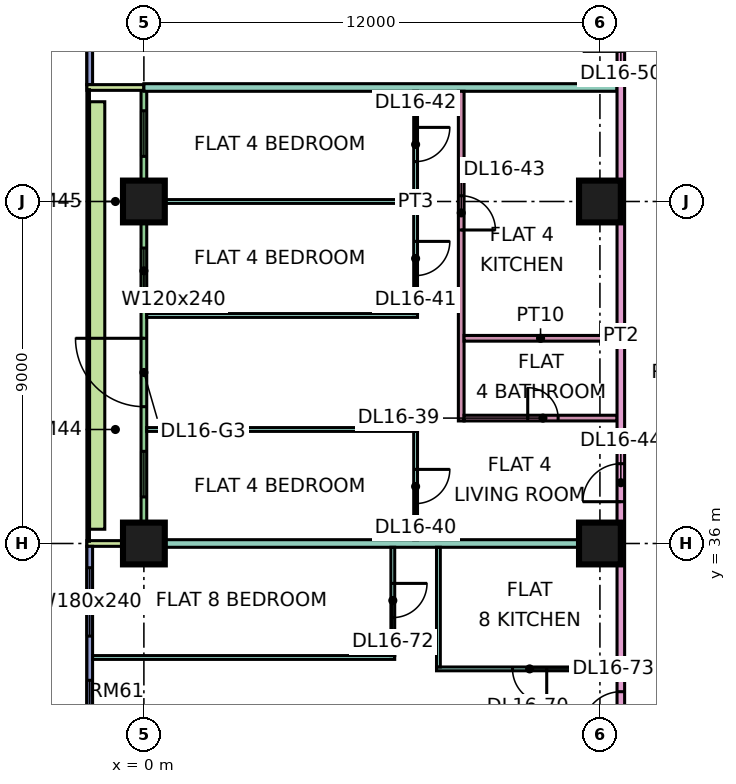
"""IFC4 building model, lengths in metres.
Left out: names, types, materials, properties, quantities, classifications, styles, units other than length and angle.
Written with IfcOpenShell. Run it as: python <this file> out.ifc"""

import sys

from ifc_helpers import new_model, si_unit, direction, frame, frame_2d, origin, origin_2d, place, context, subcontext, project, spatial, rectangle, extrude, element, fill, save


model = new_model("IFC4")
c1 = context("Model", 3, precision=1e-05, world=origin(), true_north=direction((0.0, 1.0)))
c2 = subcontext(c1, "Body", "Model", "MODEL_VIEW")
j1 = project(units=[si_unit("LENGTHUNIT", "METRE"), si_unit("PLANEANGLEUNIT", "RADIAN")], contexts=[c1])
p1 = place(None, origin())
s1 = spatial("IfcSite", under=j1, at=p1, CompositionType="ELEMENT")
p2 = place(p1, origin())
s2 = spatial("IfcBuilding", under=s1, at=p2, CompositionType="ELEMENT")
p3 = place(p2, frame((0.0, 0.0, 75.15)))
s3 = spatial("IfcBuildingStorey", under=s2, at=p3, CompositionType="ELEMENT", Elevation=75.15)
p4 = place(p3, frame((0.0, 36.0, 0.0), z_axis=(0.0, 0.0, 1.0), x_axis=(1.0, 0.0, 0.0)))
e1 = element("IfcColumn", 1, at=p4, inside=s3, PredefinedType="COLUMN", context=c2, shape_type="SweptSolid", body=[
    extrude(rectangle(XDim=1.1, YDim=1.1, at=origin_2d()), origin(), (0.0, 0.0, 1.0), 3.75),
])
for number, where, z_axis, x_axis in (
    (2, (0.0, 45.0, 0.0), (0.0, 0.0, 1.0), (1.0, 0.0, 0.0)),
    (3, (12.0, 36.0, 0.0), (0.0, 0.0, 1.0), (1.0, 0.0, 0.0)),
    (4, (12.0, 45.0, 0.0), (0.0, 0.0, 1.0), (1.0, 0.0, 0.0)),
):
    element("IfcColumn", number, at=place(p3, frame(where, z_axis=z_axis, x_axis=x_axis)), inside=s3, PredefinedType="COLUMN", context=c2, shape_type="SweptSolid", body=[
        extrude(rectangle(XDim=1.1, YDim=1.1, at=origin_2d()), origin(), (0.0, 0.0, 1.0), 3.75),
    ])
p5 = place(p3, frame((-1.425, 61.5, 0.0), z_axis=(0.0, 0.0, 1.0), x_axis=(0.0, -1.0, 0.0)))
e5 = element("IfcWall", 5, at=p5, inside=s3, PredefinedType="SOLIDWALL", context=c2, shape_type="SweptSolid", body=[
    extrude(rectangle(XDim=13.425, YDim=0.15, at=frame_2d((6.712, 0.0))), origin(), (0.0, 0.0, 1.0), 3.35),
])
p6 = place(p5, frame((0.3, 0.0, 0.45)))
e6 = element("IfcOpeningElement", 6, at=p6, cuts=e5, PredefinedType="OPENING", context=c2, shape_type="SweptSolid", body=[
    extrude(rectangle(XDim=0.9, YDim=2.4, at=frame_2d((0.45, 1.2))), frame((0.0, 0.085, 0.0), z_axis=(0.0, -1.0, 0.0), x_axis=(1.0, 0.0, 0.0)), (0.0, 0.0, 1.0), 0.17),
])
p7 = place(p5, frame((2.1, 0.0, 0.45)))
e7 = element("IfcOpeningElement", 7, at=p7, cuts=e5, PredefinedType="OPENING", context=c2, shape_type="SweptSolid", body=[
    extrude(rectangle(XDim=1.8, YDim=2.4, at=frame_2d((0.9, 1.2))), frame((0.0, 0.085, 0.0), z_axis=(0.0, -1.0, 0.0), x_axis=(1.0, 0.0, 0.0)), (0.0, 0.0, 1.0), 0.17),
])
p8 = place(p5, frame((5.1, 0.0, 0.45)))
e8 = element("IfcOpeningElement", 8, at=p8, cuts=e5, PredefinedType="OPENING", context=c2, shape_type="SweptSolid", body=[
    extrude(rectangle(XDim=1.8, YDim=2.4, at=frame_2d((0.9, 1.2))), frame((0.0, 0.085, 0.0), z_axis=(0.0, -1.0, 0.0), x_axis=(1.0, 0.0, 0.0)), (0.0, 0.0, 1.0), 0.17),
])
p9 = place(p5, frame((8.962, 0.0, 0.45)))
e9 = element("IfcOpeningElement", 9, at=p9, cuts=e5, PredefinedType="OPENING", context=c2, shape_type="SweptSolid", body=[
    extrude(rectangle(XDim=3.0, YDim=2.4, at=frame_2d((1.5, 1.2))), frame((0.0, 0.085, 0.0), z_axis=(0.0, -1.0, 0.0), x_axis=(1.0, 0.0, 0.0)), (0.0, 0.0, 1.0), 0.17),
])
p10 = place(p3, frame((0.0, 47.925, 0.0), z_axis=(0.0, 0.0, 1.0), x_axis=(0.0, -1.0, 0.0)))
e10 = element("IfcWall", 10, at=p10, inside=s3, PredefinedType="SOLIDWALL", context=c2, shape_type="SweptSolid", body=[
    extrude(rectangle(XDim=11.85, YDim=0.15, at=frame_2d((5.925, 0.0))), origin(), (0.0, 0.0, 1.0), 3.35),
])
p11 = place(p10, frame((0.538, 0.0, 0.45)))
e11 = element("IfcOpeningElement", 11, at=p11, cuts=e10, PredefinedType="OPENING", context=c2, shape_type="SweptSolid", body=[
    extrude(rectangle(XDim=1.2, YDim=2.4, at=frame_2d((0.6, 1.2))), frame((0.0, 0.085, 0.0), z_axis=(0.0, -1.0, 0.0), x_axis=(1.0, 0.0, 0.0)), (0.0, 0.0, 1.0), 0.17),
])
p12 = place(p10, frame((4.15, 0.0, 0.45)))
e12 = element("IfcOpeningElement", 12, at=p12, cuts=e10, PredefinedType="OPENING", context=c2, shape_type="SweptSolid", body=[
    extrude(rectangle(XDim=1.2, YDim=2.4, at=frame_2d((0.6, 1.2))), frame((0.0, 0.085, 0.0), z_axis=(0.0, -1.0, 0.0), x_axis=(1.0, 0.0, 0.0)), (0.0, 0.0, 1.0), 0.17),
])
p13 = place(p10, frame((6.525, 0.0, 0.0)))
e13 = element("IfcOpeningElement", 13, at=p13, cuts=e10, PredefinedType="OPENING", context=c2, shape_type="SweptSolid", body=[
    extrude(rectangle(XDim=1.8, YDim=2.4, at=frame_2d((0.9, 1.2))), frame((0.0, 0.085, 0.0), z_axis=(0.0, -1.0, 0.0), x_axis=(1.0, 0.0, 0.0)), (0.0, 0.0, 1.0), 0.17),
])
p14 = place(p10, frame((9.5, 0.0, 0.45)))
e14 = element("IfcOpeningElement", 14, at=p14, cuts=e10, PredefinedType="OPENING", context=c2, shape_type="SweptSolid", body=[
    extrude(rectangle(XDim=1.2, YDim=2.4, at=frame_2d((0.6, 1.2))), frame((0.0, 0.085, 0.0), z_axis=(0.0, -1.0, 0.0), x_axis=(1.0, 0.0, 0.0)), (0.0, 0.0, 1.0), 0.17),
])
for number, where, z_axis, x_axis in (
    (15, (-1.5, 48.0, 0.0), (0.0, 0.0, 1.0), (1.0, 0.0, 0.0)),
    (16, (-1.5, 36.0, 0.0), (0.0, 0.0, 1.0), (1.0, 0.0, 0.0)),
):
    element("IfcWall", number, at=place(p3, frame(where, z_axis=z_axis, x_axis=x_axis)), inside=s3, PredefinedType="SOLIDWALL", context=c2, shape_type="SweptSolid", body=[
        extrude(rectangle(XDim=1.5, YDim=0.15, at=frame_2d((0.75, 0.0))), origin(), (0.0, 0.0, 1.0), 3.35),
    ])
p15 = place(p3, frame((-1.425, 35.925, 0.0), z_axis=(0.0, 0.0, 1.0), x_axis=(0.0, -1.0, 0.0)))
e17 = element("IfcWall", 17, at=p15, inside=s3, PredefinedType="SOLIDWALL", context=c2, shape_type="SweptSolid", body=[
    extrude(rectangle(XDim=11.85, YDim=0.15, at=frame_2d((5.925, 0.0))), origin(), (0.0, 0.0, 1.0), 3.35),
])
p16 = place(p15, frame((0.562, 0.0, 0.45)))
e18 = element("IfcOpeningElement", 18, at=p16, cuts=e17, PredefinedType="OPENING", context=c2, shape_type="SweptSolid", body=[
    extrude(rectangle(XDim=1.8, YDim=2.4, at=frame_2d((0.9, 1.2))), frame((0.0, 0.085, 0.0), z_axis=(0.0, -1.0, 0.0), x_axis=(1.0, 0.0, 0.0)), (0.0, 0.0, 1.0), 0.17),
])
p17 = place(p15, frame((3.525, 0.0, 0.45)))
e19 = element("IfcOpeningElement", 19, at=p17, cuts=e17, PredefinedType="OPENING", context=c2, shape_type="SweptSolid", body=[
    extrude(rectangle(XDim=4.8, YDim=2.4, at=frame_2d((2.4, 1.2))), frame((0.0, 0.085, 0.0), z_axis=(0.0, -1.0, 0.0), x_axis=(1.0, 0.0, 0.0)), (0.0, 0.0, 1.0), 0.17),
])
p18 = place(p15, frame((9.488, 0.0, 0.45)))
e20 = element("IfcOpeningElement", 20, at=p18, cuts=e17, PredefinedType="OPENING", context=c2, shape_type="SweptSolid", body=[
    extrude(rectangle(XDim=1.8, YDim=2.4, at=frame_2d((0.9, 1.2))), frame((0.0, 0.085, 0.0), z_axis=(0.0, -1.0, 0.0), x_axis=(1.0, 0.0, 0.0)), (0.0, 0.0, 1.0), 0.17),
])
p19 = place(p3, frame((-1.229, 47.625, 0.0), z_axis=(0.0, 0.0, 1.0), x_axis=(0.0, -1.0, 0.0)))
e21 = element("IfcWall", 21, at=p19, inside=s3, PredefinedType="SOLIDWALL", context=c2, shape_type="SweptSolid", body=[
    extrude(rectangle(XDim=11.25, YDim=0.4, at=frame_2d((5.625, 0.0))), origin(), (0.0, 0.0, 1.0), 0.7),
])
p20 = place(p3, frame((-1.35, 33.0, 0.0), z_axis=(0.0, 0.0, 1.0), x_axis=(1.0, 0.0, 0.0)))
e22 = element("IfcWall", 22, at=p20, inside=s3, PredefinedType="PARTITIONING", context=c2, shape_type="SweptSolid", body=[
    extrude(rectangle(XDim=7.95, YDim=0.1, at=frame_2d((3.975, 0.0))), origin(), (0.0, 0.0, 1.0), 3.35),
])
e23 = element("IfcWall", 23, at=p4, inside=s3, PredefinedType="PARTITIONING", context=c2, shape_type="SweptSolid", body=[
    extrude(rectangle(XDim=12.45, YDim=0.2, at=frame_2d((6.225, 0.0))), origin(), (0.0, 0.0, 1.0), 3.35),
])
p21 = place(p3, frame((0.0, 48.0, 0.0), z_axis=(0.0, 0.0, 1.0), x_axis=(1.0, 0.0, 0.0)))
e24 = element("IfcWall", 24, at=p21, inside=s3, PredefinedType="PARTITIONING", context=c2, shape_type="SweptSolid", body=[
    extrude(rectangle(XDim=12.45, YDim=0.2, at=frame_2d((6.225, 0.0))), origin(), (0.0, 0.0, 1.0), 3.35),
])
for number, where, z_axis, x_axis in (
    (25, (0.074, 39.0, 0.0), (0.0, 0.0, 1.0), (1.0, 0.0, 0.0)),
    (26, (0.074, 42.0, 0.0), (0.0, 0.0, 1.0), (1.0, 0.0, 0.0)),
):
    element("IfcWall", number, at=place(p3, frame(where, z_axis=z_axis, x_axis=x_axis)), inside=s3, PredefinedType="PARTITIONING", context=c2, shape_type="SweptSolid", body=[
        extrude(rectangle(XDim=7.126, YDim=0.1, at=frame_2d((3.563, 0.0))), origin(), (0.0, 0.0, 1.0), 3.35),
    ])
p22 = place(p3, frame((0.074, 45.0, 0.0), z_axis=(0.0, 0.0, 1.0), x_axis=(1.0, 0.0, 0.0)))
e27 = element("IfcWall", 27, at=p22, inside=s3, PredefinedType="PARTITIONING", context=c2, shape_type="SweptSolid", body=[
    extrude(rectangle(XDim=7.026, YDim=0.1, at=frame_2d((3.513, 0.0))), origin(), (0.0, 0.0, 1.0), 3.35),
])
p23 = place(p3, frame((6.55, 33.05, 0.0), z_axis=(0.0, 0.0, 1.0), x_axis=(0.0, 1.0, 0.0)))
e28 = element("IfcWall", 28, at=p23, inside=s3, PredefinedType="PARTITIONING", context=c2, shape_type="SweptSolid", body=[
    extrude(rectangle(XDim=2.85, YDim=0.1, at=frame_2d((1.425, 0.0))), origin(), (0.0, 0.0, 1.0), 3.35),
])
p24 = place(p23, frame((1.0, 0.0, 0.0)))
e29 = element("IfcOpeningElement", 29, at=p24, cuts=e28, PredefinedType="OPENING", context=c2, shape_type="SweptSolid", body=[
    extrude(rectangle(XDim=0.9, YDim=2.1, at=frame_2d((0.45, 1.05))), frame((0.0, 0.06, 0.0), z_axis=(0.0, -1.0, 0.0), x_axis=(1.0, 0.0, 0.0)), (0.0, 0.0, 1.0), 0.12),
])
p25 = place(p3, frame((7.15, 36.1, 0.0), z_axis=(0.0, 0.0, 1.0), x_axis=(0.0, 1.0, 0.0)))
e30 = element("IfcWall", 30, at=p25, inside=s3, PredefinedType="PARTITIONING", context=c2, shape_type="SweptSolid", body=[
    extrude(rectangle(XDim=2.85, YDim=0.1, at=frame_2d((1.425, 0.0))), origin(), (0.0, 0.0, 1.0), 3.35),
])
p26 = place(p25, frame((0.95, 0.0, 0.0)))
e31 = element("IfcOpeningElement", 31, at=p26, cuts=e30, PredefinedType="OPENING", context=c2, shape_type="SweptSolid", body=[
    extrude(rectangle(XDim=0.9, YDim=2.1, at=frame_2d((0.45, 1.05))), frame((0.0, 0.06, 0.0), z_axis=(0.0, -1.0, 0.0), x_axis=(1.0, 0.0, 0.0)), (0.0, 0.0, 1.0), 0.12),
])
p27 = place(p3, frame((7.15, 42.05, 0.0), z_axis=(0.0, 0.0, 1.0), x_axis=(0.0, 1.0, 0.0)))
e32 = element("IfcWall", 32, at=p27, inside=s3, PredefinedType="PARTITIONING", context=c2, shape_type="SweptSolid", body=[
    extrude(rectangle(XDim=5.85, YDim=0.1, at=frame_2d((2.925, 0.0))), origin(), (0.0, 0.0, 1.0), 3.35),
])
p28 = place(p27, frame((1.0, 0.0, 0.0)))
e33 = element("IfcOpeningElement", 33, at=p28, cuts=e32, PredefinedType="OPENING", context=c2, shape_type="SweptSolid", body=[
    extrude(rectangle(XDim=0.9, YDim=2.1, at=frame_2d((0.45, 1.05))), frame((0.0, 0.06, 0.0), z_axis=(0.0, -1.0, 0.0), x_axis=(1.0, 0.0, 0.0)), (0.0, 0.0, 1.0), 0.12),
])
p29 = place(p27, frame((4.0, 0.0, 0.0)))
e34 = element("IfcOpeningElement", 34, at=p29, cuts=e32, PredefinedType="OPENING", context=c2, shape_type="SweptSolid", body=[
    extrude(rectangle(XDim=0.9, YDim=2.1, at=frame_2d((0.45, 1.05))), frame((0.0, 0.06, 0.0), z_axis=(0.0, -1.0, 0.0), x_axis=(1.0, 0.0, 0.0)), (0.0, 0.0, 1.0), 0.12),
])
p30 = place(p3, frame((7.7, 32.7, 0.0), z_axis=(0.0, 0.0, 1.0), x_axis=(1.0, 0.0, 0.0)))
e35 = element("IfcWall", 35, at=p30, inside=s3, PredefinedType="PARTITIONING", context=c2, shape_type="SweptSolid", body=[
    extrude(rectangle(XDim=4.75, YDim=0.1, at=frame_2d((2.375, 0.0))), origin(), (0.0, 0.0, 1.0), 3.35),
])
p31 = place(p30, frame((2.0, 0.0, 0.0)))
e36 = element("IfcOpeningElement", 36, at=p31, cuts=e35, PredefinedType="OPENING", context=c2, shape_type="SweptSolid", body=[
    extrude(rectangle(XDim=0.9, YDim=2.1, at=frame_2d((0.45, 1.05))), frame((0.0, 0.06, 0.0), z_axis=(0.0, -1.0, 0.0), x_axis=(1.0, 0.0, 0.0)), (0.0, 0.0, 1.0), 0.12),
])
p32 = place(p3, frame((7.75, 32.75, 0.0), z_axis=(0.0, 0.0, 1.0), x_axis=(0.0, 1.0, 0.0)))
e37 = element("IfcWall", 37, at=p32, inside=s3, PredefinedType="PARTITIONING", context=c2, shape_type="SweptSolid", body=[
    extrude(rectangle(XDim=3.15, YDim=0.1, at=frame_2d((1.575, 0.0))), origin(), (0.0, 0.0, 1.0), 3.35),
])
p33 = place(p3, frame((8.35, 39.225, 0.0), z_axis=(0.0, 0.0, 1.0), x_axis=(0.0, 1.0, 0.0)))
e38 = element("IfcWall", 38, at=p33, inside=s3, PredefinedType="PARTITIONING", context=c2, shape_type="SweptSolid", body=[
    extrude(rectangle(XDim=8.675, YDim=0.15, at=frame_2d((4.337, 0.0))), origin(), (0.0, 0.0, 1.0), 3.35),
])
p34 = place(p33, frame((5.025, 0.0, 0.0)))
e39 = element("IfcOpeningElement", 39, at=p34, cuts=e38, PredefinedType="OPENING", context=c2, shape_type="SweptSolid", body=[
    extrude(rectangle(XDim=0.9, YDim=2.1, at=frame_2d((0.45, 1.05))), frame((0.0, 0.085, 0.0), z_axis=(0.0, -1.0, 0.0), x_axis=(1.0, 0.0, 0.0)), (0.0, 0.0, 1.0), 0.17),
])
p35 = place(p3, frame((8.425, 39.3, 0.0), z_axis=(0.0, 0.0, 1.0), x_axis=(1.0, 0.0, 0.0)))
e40 = element("IfcWall", 40, at=p35, inside=s3, PredefinedType="PARTITIONING", context=c2, shape_type="SweptSolid", body=[
    extrude(rectangle(XDim=4.025, YDim=0.15, at=frame_2d((2.012, 0.0))), origin(), (0.0, 0.0, 1.0), 3.35),
])
p36 = place(p35, frame((1.675, 0.0, 0.0)))
e41 = element("IfcOpeningElement", 41, at=p36, cuts=e40, PredefinedType="OPENING", context=c2, shape_type="SweptSolid", body=[
    extrude(rectangle(XDim=0.8, YDim=2.1, at=frame_2d((0.4, 1.05))), frame((0.0, 0.085, 0.0), z_axis=(0.0, -1.0, 0.0), x_axis=(1.0, 0.0, 0.0)), (0.0, 0.0, 1.0), 0.17),
])
p37 = place(p3, frame((8.425, 41.4, 0.0), z_axis=(0.0, 0.0, 1.0), x_axis=(1.0, 0.0, 0.0)))
e42 = element("IfcWall", 42, at=p37, inside=s3, PredefinedType="PARTITIONING", context=c2, shape_type="SweptSolid", body=[
    extrude(rectangle(XDim=4.025, YDim=0.15, at=frame_2d((2.012, 0.0))), origin(), (0.0, 0.0, 1.0), 3.35),
])
p38 = place(p3, frame((12.55, 20.0, 0.0), z_axis=(0.0, 0.0, 1.0), x_axis=(0.0, 1.0, 0.0)))
e43 = element("IfcWall", 43, at=p38, inside=s3, PredefinedType="PARTITIONING", context=c2, shape_type="SweptSolid", body=[
    extrude(rectangle(XDim=42.926, YDim=0.2, at=frame_2d((21.463, 0.0))), origin(), (0.0, 0.0, 1.0), 3.35),
])
p39 = place(p38, frame((17.1, 0.0, 0.0)))
e44 = element("IfcOpeningElement", 44, at=p39, cuts=e43, PredefinedType="OPENING", context=c2, shape_type="SweptSolid", body=[
    extrude(rectangle(XDim=1.0, YDim=2.1, at=frame_2d((0.5, 1.05))), frame((0.0, 0.11, 0.0), z_axis=(0.0, -1.0, 0.0), x_axis=(1.0, 0.0, 0.0)), (0.0, 0.0, 1.0), 0.22),
])
p40 = place(p38, frame((28.95, 0.0, 0.0)))
e45 = element("IfcOpeningElement", 45, at=p40, cuts=e43, PredefinedType="OPENING", context=c2, shape_type="SweptSolid", body=[
    extrude(rectangle(XDim=1.0, YDim=2.1, at=frame_2d((0.5, 1.05))), frame((0.0, 0.11, 0.0), z_axis=(0.0, -1.0, 0.0), x_axis=(1.0, 0.0, 0.0)), (0.0, 0.0, 1.0), 0.22),
])
p41 = place(p38, frame((0.6, 0.0, 0.0)))
e46 = element("IfcOpeningElement", 46, at=p41, cuts=e43, PredefinedType="OPENING", context=c2, shape_type="SweptSolid", body=[
    extrude(rectangle(XDim=1.2, YDim=2.1, at=frame_2d((0.6, 1.05))), frame((0.0, 0.11, 0.0), z_axis=(0.0, -1.0, 0.0), x_axis=(1.0, 0.0, 0.0)), (0.0, 0.0, 1.0), 0.22),
])
p42 = place(p38, frame((11.1, 0.0, 0.0)))
e47 = element("IfcOpeningElement", 47, at=p42, cuts=e43, PredefinedType="OPENING", context=c2, shape_type="SweptSolid", body=[
    extrude(rectangle(XDim=1.0, YDim=2.1, at=frame_2d((0.5, 1.05))), frame((0.0, 0.11, 0.0), z_axis=(0.0, -1.0, 0.0), x_axis=(1.0, 0.0, 0.0)), (0.0, 0.0, 1.0), 0.22),
])
p43 = place(p11, origin())
e48 = element("IfcWindow", 48, at=p43, inside=s3, PartitioningType="SINGLE_PANEL", PredefinedType="WINDOW", context=c2, shape_type="SweptSolid", body=[
    extrude(rectangle(XDim=1.2, YDim=2.4, at=frame_2d((0.6, 1.2))), frame((0.0, 0.03, 0.0), z_axis=(0.0, -1.0, 0.0), x_axis=(1.0, 0.0, 0.0)), (0.0, 0.0, 1.0), 0.06),
])
fill(e11, e48)
p44 = place(p12, origin())
e49 = element("IfcWindow", 49, at=p44, inside=s3, PartitioningType="SINGLE_PANEL", PredefinedType="WINDOW", context=c2, shape_type="SweptSolid", body=[
    extrude(rectangle(XDim=1.2, YDim=2.4, at=frame_2d((0.6, 1.2))), frame((0.0, 0.03, 0.0), z_axis=(0.0, -1.0, 0.0), x_axis=(1.0, 0.0, 0.0)), (0.0, 0.0, 1.0), 0.06),
])
fill(e12, e49)
p45 = place(p13, frame((1.8, 0.0, 0.0), z_axis=(0.0, 0.0, 1.0), x_axis=(-1.0, 0.0, 0.0)))
e50 = element("IfcDoor", 50, at=p45, inside=s3, OperationType="DOUBLE_DOOR_SINGLE_SWING", PredefinedType="DOOR", context=c2, shape_type="SweptSolid", body=[
    extrude(rectangle(XDim=1.8, YDim=2.4, at=frame_2d((0.9, 1.2))), frame((0.0, 0.025, 0.0), z_axis=(0.0, -1.0, 0.0), x_axis=(1.0, 0.0, 0.0)), (0.0, 0.0, 1.0), 0.05),
])
fill(e13, e50)
p46 = place(p14, origin())
e51 = element("IfcWindow", 51, at=p46, inside=s3, PartitioningType="SINGLE_PANEL", PredefinedType="WINDOW", context=c2, shape_type="SweptSolid", body=[
    extrude(rectangle(XDim=1.2, YDim=2.4, at=frame_2d((0.6, 1.2))), frame((0.0, 0.03, 0.0), z_axis=(0.0, -1.0, 0.0), x_axis=(1.0, 0.0, 0.0)), (0.0, 0.0, 1.0), 0.06),
])
fill(e14, e51)
p47 = place(p16, origin())
e52 = element("IfcWindow", 52, at=p47, inside=s3, PartitioningType="SINGLE_PANEL", PredefinedType="WINDOW", context=c2, shape_type="SweptSolid", body=[
    extrude(rectangle(XDim=1.8, YDim=2.4, at=frame_2d((0.9, 1.2))), frame((0.0, 0.03, 0.0), z_axis=(0.0, -1.0, 0.0), x_axis=(1.0, 0.0, 0.0)), (0.0, 0.0, 1.0), 0.06),
])
fill(e18, e52)
p48 = place(p17, origin())
e53 = element("IfcWindow", 53, at=p48, inside=s3, PartitioningType="SINGLE_PANEL", PredefinedType="WINDOW", context=c2, shape_type="SweptSolid", body=[
    extrude(rectangle(XDim=4.8, YDim=2.4, at=frame_2d((2.4, 1.2))), frame((0.0, 0.03, 0.0), z_axis=(0.0, -1.0, 0.0), x_axis=(1.0, 0.0, 0.0)), (0.0, 0.0, 1.0), 0.06),
])
fill(e19, e53)
p49 = place(p36, origin())
e54 = element("IfcDoor", 54, at=p49, inside=s3, OperationType="SINGLE_SWING_LEFT", PredefinedType="DOOR", context=c2, shape_type="SweptSolid", body=[
    extrude(rectangle(XDim=0.8, YDim=2.1, at=frame_2d((0.4, 1.05))), frame((0.0, 0.025, 0.0), z_axis=(0.0, -1.0, 0.0), x_axis=(1.0, 0.0, 0.0)), (0.0, 0.0, 1.0), 0.05),
])
fill(e41, e54)
p50 = place(p26, origin())
e55 = element("IfcDoor", 55, at=p50, inside=s3, OperationType="SINGLE_SWING_RIGHT", PredefinedType="DOOR", context=c2, shape_type="SweptSolid", body=[
    extrude(rectangle(XDim=0.9, YDim=2.1, at=frame_2d((0.45, 1.05))), frame((0.0, 0.025, 0.0), z_axis=(0.0, -1.0, 0.0), x_axis=(1.0, 0.0, 0.0)), (0.0, 0.0, 1.0), 0.05),
])
fill(e31, e55)
p51 = place(p28, origin())
e56 = element("IfcDoor", 56, at=p51, inside=s3, OperationType="SINGLE_SWING_RIGHT", PredefinedType="DOOR", context=c2, shape_type="SweptSolid", body=[
    extrude(rectangle(XDim=0.9, YDim=2.1, at=frame_2d((0.45, 1.05))), frame((0.0, 0.025, 0.0), z_axis=(0.0, -1.0, 0.0), x_axis=(1.0, 0.0, 0.0)), (0.0, 0.0, 1.0), 0.05),
])
fill(e33, e56)
p52 = place(p29, origin())
e57 = element("IfcDoor", 57, at=p52, inside=s3, OperationType="SINGLE_SWING_RIGHT", PredefinedType="DOOR", context=c2, shape_type="SweptSolid", body=[
    extrude(rectangle(XDim=0.9, YDim=2.1, at=frame_2d((0.45, 1.05))), frame((0.0, 0.025, 0.0), z_axis=(0.0, -1.0, 0.0), x_axis=(1.0, 0.0, 0.0)), (0.0, 0.0, 1.0), 0.05),
])
fill(e34, e57)
p53 = place(p34, frame((0.9, 0.0, 0.0), z_axis=(0.0, 0.0, 1.0), x_axis=(-1.0, 0.0, 0.0)))
e58 = element("IfcDoor", 58, at=p53, inside=s3, OperationType="SINGLE_SWING_LEFT", PredefinedType="DOOR", context=c2, shape_type="SweptSolid", body=[
    extrude(rectangle(XDim=0.9, YDim=2.1, at=frame_2d((0.45, 1.05))), frame((0.0, 0.025, 0.0), z_axis=(0.0, -1.0, 0.0), x_axis=(1.0, 0.0, 0.0)), (0.0, 0.0, 1.0), 0.05),
])
fill(e39, e58)
p54 = place(p39, origin())
e59 = element("IfcDoor", 59, at=p54, inside=s3, OperationType="SINGLE_SWING_LEFT", PredefinedType="DOOR", context=c2, shape_type="SweptSolid", body=[
    extrude(rectangle(XDim=1.0, YDim=2.1, at=frame_2d((0.5, 1.05))), frame((0.0, 0.025, 0.0), z_axis=(0.0, -1.0, 0.0), x_axis=(1.0, 0.0, 0.0)), (0.0, 0.0, 1.0), 0.05),
])
fill(e44, e59)
p55 = place(p24, origin())
e60 = element("IfcDoor", 60, at=p55, inside=s3, OperationType="SINGLE_SWING_RIGHT", PredefinedType="DOOR", context=c2, shape_type="SweptSolid", body=[
    extrude(rectangle(XDim=0.9, YDim=2.1, at=frame_2d((0.45, 1.05))), frame((0.0, 0.025, 0.0), z_axis=(0.0, -1.0, 0.0), x_axis=(1.0, 0.0, 0.0)), (0.0, 0.0, 1.0), 0.05),
])
fill(e29, e60)
p56 = place(p31, origin())
e61 = element("IfcDoor", 61, at=p56, inside=s3, OperationType="SINGLE_SWING_RIGHT", PredefinedType="DOOR", context=c2, shape_type="SweptSolid", body=[
    extrude(rectangle(XDim=0.9, YDim=2.1, at=frame_2d((0.45, 1.05))), frame((0.0, 0.025, 0.0), z_axis=(0.0, -1.0, 0.0), x_axis=(1.0, 0.0, 0.0)), (0.0, 0.0, 1.0), 0.05),
])
fill(e36, e61)
p57 = place(p42, origin())
e62 = element("IfcDoor", 62, at=p57, inside=s3, OperationType="SINGLE_SWING_LEFT", PredefinedType="DOOR", context=c2, shape_type="SweptSolid", body=[
    extrude(rectangle(XDim=1.0, YDim=2.1, at=frame_2d((0.5, 1.05))), frame((0.0, 0.025, 0.0), z_axis=(0.0, -1.0, 0.0), x_axis=(1.0, 0.0, 0.0)), (0.0, 0.0, 1.0), 0.05),
])
fill(e47, e62)
save(model, sys.argv[1])
